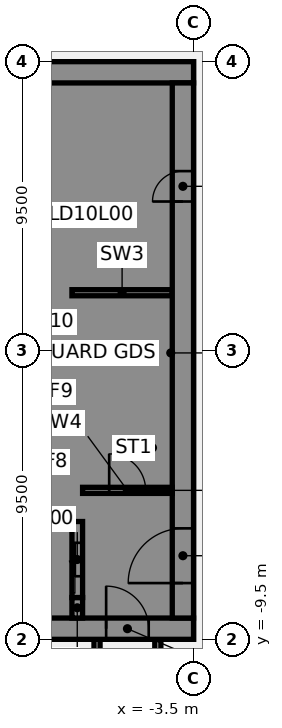
"""IFC4 building model, lengths in metres.
Left out: names, types, materials, properties, quantities, classifications, styles, units other than length and angle.
Written with IfcOpenShell. Run it as: python <this file> out.ifc"""

import sys

from ifc_helpers import new_model, si_unit, direction, frame, frame_2d, origin, place, context, subcontext, project, spatial, polyline, rectangle, outline, extrude, element, fill, save


model = new_model("IFC4")
c1 = context("Model", 3, precision=1e-05, world=origin(), true_north=direction((0.0, 1.0)))
c2 = subcontext(c1, "Body", "Model", "MODEL_VIEW")
j1 = project(units=[si_unit("LENGTHUNIT", "METRE"), si_unit("PLANEANGLEUNIT", "RADIAN")], contexts=[c1])
p1 = place(None, origin())
s1 = spatial("IfcSite", under=j1, at=p1, CompositionType="ELEMENT")
p2 = place(p1, origin())
s2 = spatial("IfcBuilding", under=s1, at=p2, CompositionType="ELEMENT")
p3 = place(p2, origin())
s3 = spatial("IfcBuildingStorey", under=s2, at=p3, CompositionType="ELEMENT", Elevation=0.0)
p4 = place(p3, frame((-4.675, -9.5, 0.0), z_axis=(0.0, 0.0, 1.0), x_axis=(0.0, -1.0, 0.0)))
e1 = element("IfcWall", 1, at=p4, inside=s3, PredefinedType="PARTITIONING", context=c2, shape_type="SweptSolid", body=[
    extrude(rectangle(XDim=3.35, YDim=0.2, at=frame_2d((1.675, 0.0))), origin(), (0.0, 0.0, 1.0), 8.5),
])
p5 = place(p3, frame((-6.675, -9.5, 0.0), z_axis=(0.0, 0.0, 1.0), x_axis=(0.0, -1.0, 0.0)))
e2 = element("IfcWall", 2, at=p5, inside=s3, PredefinedType="PARTITIONING", context=c2, shape_type="SweptSolid", body=[
    extrude(rectangle(XDim=1.35, YDim=0.2, at=frame_2d((0.675, 0.0))), origin(), (0.0, 0.0, 1.0), 8.5),
])
p6 = place(p3, frame((-16.5, -9.15, 0.0), z_axis=(0.0, 0.0, 1.0), x_axis=(1.0, 0.0, 0.0)))
e3 = element("IfcWall", 3, at=p6, inside=s3, PredefinedType="SHEAR", context=c2, shape_type="SweptSolid", body=[
    extrude(rectangle(XDim=13.0, YDim=0.7, at=frame_2d((6.5, 0.0))), origin(), (0.0, 0.0, 1.0), 8.5),
])
p7 = place(p6, frame((4.15, 0.0, 0.0)))
e4 = element("IfcOpeningElement", 4, at=p7, cuts=e3, PredefinedType="OPENING", context=c2, shape_type="SweptSolid", body=[
    extrude(rectangle(XDim=1.4, YDim=2.1, at=frame_2d((0.7, 1.05))), frame((0.0, 0.36, 0.0), z_axis=(0.0, -1.0, 0.0), x_axis=(1.0, 0.0, 0.0)), (0.0, 0.0, 1.0), 0.72),
])
p8 = place(p6, frame((10.125, 0.0, 0.0)))
e5 = element("IfcOpeningElement", 5, at=p8, cuts=e3, PredefinedType="OPENING", context=c2, shape_type="SweptSolid", body=[
    extrude(rectangle(XDim=1.4, YDim=2.1, at=frame_2d((0.7, 1.05))), frame((0.0, 0.36, 0.0), z_axis=(0.0, -1.0, 0.0), x_axis=(1.0, 0.0, 0.0)), (0.0, 0.0, 1.0), 0.72),
])
p9 = place(p3, frame((-16.5, 9.15, 0.0), z_axis=(0.0, 0.0, 1.0), x_axis=(1.0, 0.0, 0.0)))
e6 = element("IfcWall", 6, at=p9, inside=s3, PredefinedType="SHEAR", context=c2, shape_type="SweptSolid", body=[
    extrude(rectangle(XDim=13.0, YDim=0.7, at=frame_2d((6.5, 0.0))), origin(), (0.0, 0.0, 1.0), 8.5),
])
p10 = place(p9, frame((4.15, 0.0, 0.0)))
e7 = element("IfcOpeningElement", 7, at=p10, cuts=e6, PredefinedType="OPENING", context=c2, shape_type="SweptSolid", body=[
    extrude(rectangle(XDim=1.4, YDim=2.1, at=frame_2d((0.7, 1.05))), frame((0.0, 0.36, 0.0), z_axis=(0.0, -1.0, 0.0), x_axis=(1.0, 0.0, 0.0)), (0.0, 0.0, 1.0), 0.72),
])
p11 = place(p3, origin())
e8 = element("IfcWall", 8, at=p11, inside=s3, PredefinedType="SHEAR", context=c2, shape_type="SweptSolid", body=[
    extrude(outline(polyline([(-9.8, -5.375), (-9.8, -5.625), (-7.5, -5.625), (-7.15, -5.625), (-7.15, 8.8), (-7.5, 8.8), (-9.8, 8.8), (-9.8, 8.125), (-7.5, 8.125), (-7.5, 5.625), (-9.8, 5.625), (-9.8, 5.375), (-7.5, 5.375), (-7.5, 2.875), (-9.8, 2.875), (-9.8, 2.625), (-7.5, 2.625), (-7.5, 0.125), (-9.8, 0.125), (-9.8, -0.125), (-7.5, -0.125), (-7.5, -2.625), (-9.8, -2.625), (-9.8, -2.875), (-7.5, -2.875), (-7.5, -5.375), (-9.8, -5.375)])), origin(), (0.0, 0.0, 1.0), 8.5),
])
p12 = place(p3, origin())
e9 = element("IfcWall", 9, at=p12, inside=s3, PredefinedType="SHEAR", context=c2, shape_type="SweptSolid", body=[
    extrude(outline(polyline([(-7.5, -8.125), (-9.55, -8.125), (-9.55, -5.625), (-9.8, -5.625), (-9.8, -8.125), (-9.8, -8.8), (-7.5, -8.8), (-7.5, -8.125)])), origin(), (0.0, 0.0, 1.0), 8.5),
])
p13 = place(p3, frame((-7.325, -8.8, 0.0), z_axis=(0.0, 0.0, 1.0), x_axis=(0.0, 1.0, 0.0)))
e10 = element("IfcWall", 10, at=p13, inside=s3, PredefinedType="SHEAR", context=c2, shape_type="SweptSolid", body=[
    extrude(rectangle(XDim=0.675, YDim=0.35, at=frame_2d((0.337, 0.0))), origin(), (0.0, 0.0, 1.0), 8.5),
])
p14 = place(p3, frame((-7.5, 1.9, 0.0), z_axis=(0.0, 0.0, 1.0), x_axis=(1.0, 0.0, 0.0)))
e11 = element("IfcWall", 11, at=p14, inside=s3, PredefinedType="SHEAR", context=c2, shape_type="SweptSolid", body=[
    extrude(rectangle(XDim=3.3, YDim=0.2, at=frame_2d((1.65, 0.0))), origin(), (0.0, 0.0, 1.0), 8.5),
])
p15 = place(p3, frame((-7.325, -8.125, 0.0), z_axis=(0.0, 0.0, 1.0), x_axis=(0.0, 1.0, 0.0)))
e12 = element("IfcWall", 12, at=p15, inside=s3, PredefinedType="SHEAR", context=c2, shape_type="SweptSolid", body=[
    extrude(rectangle(XDim=2.5, YDim=0.35, at=frame_2d((1.25, 0.0))), origin(), (0.0, 0.0, 1.0), 8.5),
])
p16 = place(p15, frame((0.7, 0.0, 0.0)))
e13 = element("IfcOpeningElement", 13, at=p16, cuts=e12, PredefinedType="OPENING", context=c2, shape_type="SweptSolid", body=[
    extrude(rectangle(XDim=1.1, YDim=2.1, at=frame_2d((0.55, 1.05))), frame((0.0, 0.185, 0.0), z_axis=(0.0, -1.0, 0.0), x_axis=(1.0, 0.0, 0.0)), (0.0, 0.0, 1.0), 0.37),
])
p17 = place(p3, frame((-3.85, -8.8, 0.0), z_axis=(0.0, 0.0, 1.0), x_axis=(0.0, 1.0, 0.0)))
e14 = element("IfcWall", 14, at=p17, inside=s3, PredefinedType="SHEAR", context=c2, shape_type="SweptSolid", body=[
    extrude(rectangle(XDim=17.6, YDim=0.7, at=frame_2d((8.8, 0.0))), origin(), (0.0, 0.0, 1.0), 8.5),
])
p18 = place(p17, frame((1.15, 0.0, 0.0)))
e15 = element("IfcOpeningElement", 15, at=p18, cuts=e14, PredefinedType="OPENING", context=c2, shape_type="SweptSolid", body=[
    extrude(rectangle(XDim=1.8, YDim=2.1, at=frame_2d((0.9, 1.05))), frame((0.0, 0.36, 0.0), z_axis=(0.0, -1.0, 0.0), x_axis=(1.0, 0.0, 0.0)), (0.0, 0.0, 1.0), 0.72),
])
p19 = place(p17, frame((13.7, 0.0, 0.0)))
e16 = element("IfcOpeningElement", 16, at=p19, cuts=e14, PredefinedType="OPENING", context=c2, shape_type="SweptSolid", body=[
    extrude(rectangle(XDim=1.0, YDim=2.1, at=frame_2d((0.5, 1.05))), frame((0.0, 0.36, 0.0), z_axis=(0.0, -1.0, 0.0), x_axis=(1.0, 0.0, 0.0)), (0.0, 0.0, 1.0), 0.72),
])
p20 = place(p3, frame((-7.15, -4.6, 0.0), z_axis=(0.0, 0.0, 1.0), x_axis=(1.0, 0.0, 0.0)))
e17 = element("IfcWall", 17, at=p20, inside=s3, PredefinedType="SHEAR", context=c2, shape_type="SweptSolid", body=[
    extrude(rectangle(XDim=2.95, YDim=0.2, at=frame_2d((1.475, 0.0))), origin(), (0.0, 0.0, 1.0), 8.5),
])
p21 = place(p20, frame((0.875, 0.0, 0.0)))
e18 = element("IfcOpeningElement", 18, at=p21, cuts=e17, PredefinedType="OPENING", context=c2, shape_type="SweptSolid", body=[
    extrude(rectangle(XDim=1.2, YDim=2.1, at=frame_2d((0.6, 1.05))), frame((0.0, 0.11, 0.0), z_axis=(0.0, -1.0, 0.0), x_axis=(1.0, 0.0, 0.0)), (0.0, 0.0, 1.0), 0.22),
])
p22 = place(p8, origin())
e19 = element("IfcDoor", 19, at=p22, inside=s3, OperationType="SINGLE_SWING_LEFT", PredefinedType="DOOR", context=c2, shape_type="SweptSolid", body=[
    extrude(rectangle(XDim=1.4, YDim=2.1, at=frame_2d((0.7, 1.05))), frame((0.0, 0.025, 0.0), z_axis=(0.0, -1.0, 0.0), x_axis=(1.0, 0.0, 0.0)), (0.0, 0.0, 1.0), 0.05),
])
fill(e5, e19)
p23 = place(p18, origin())
e20 = element("IfcDoor", 20, at=p23, inside=s3, OperationType="SINGLE_SWING_LEFT", PredefinedType="DOOR", context=c2, shape_type="SweptSolid", body=[
    extrude(rectangle(XDim=1.8, YDim=2.1, at=frame_2d((0.9, 1.05))), frame((0.0, 0.025, 0.0), z_axis=(0.0, -1.0, 0.0), x_axis=(1.0, 0.0, 0.0)), (0.0, 0.0, 1.0), 0.05),
])
fill(e15, e20)
p24 = place(p19, origin())
e21 = element("IfcDoor", 21, at=p24, inside=s3, OperationType="SINGLE_SWING_LEFT", PredefinedType="DOOR", context=c2, shape_type="SweptSolid", body=[
    extrude(rectangle(XDim=1.0, YDim=2.1, at=frame_2d((0.5, 1.05))), frame((0.0, 0.025, 0.0), z_axis=(0.0, -1.0, 0.0), x_axis=(1.0, 0.0, 0.0)), (0.0, 0.0, 1.0), 0.05),
])
fill(e16, e21)
p25 = place(p21, origin())
e22 = element("IfcDoor", 22, at=p25, inside=s3, OperationType="SINGLE_SWING_LEFT", PredefinedType="DOOR", context=c2, shape_type="SweptSolid", body=[
    extrude(rectangle(XDim=1.2, YDim=2.1, at=frame_2d((0.6, 1.05))), frame((0.0, 0.025, 0.0), z_axis=(0.0, -1.0, 0.0), x_axis=(1.0, 0.0, 0.0)), (0.0, 0.0, 1.0), 0.05),
])
fill(e18, e22)
p26 = place(p16, origin())
e23 = element("IfcDoor", 23, at=p26, inside=s3, OperationType="SLIDING_TO_LEFT", PredefinedType="DOOR", context=c2, shape_type="SweptSolid", body=[
    extrude(rectangle(XDim=1.1, YDim=2.1, at=frame_2d((0.55, 1.05))), frame((0.0, 0.025, 0.0), z_axis=(0.0, -1.0, 0.0), x_axis=(1.0, 0.0, 0.0)), (0.0, 0.0, 1.0), 0.05),
])
fill(e13, e23)
save(model, sys.argv[1])
